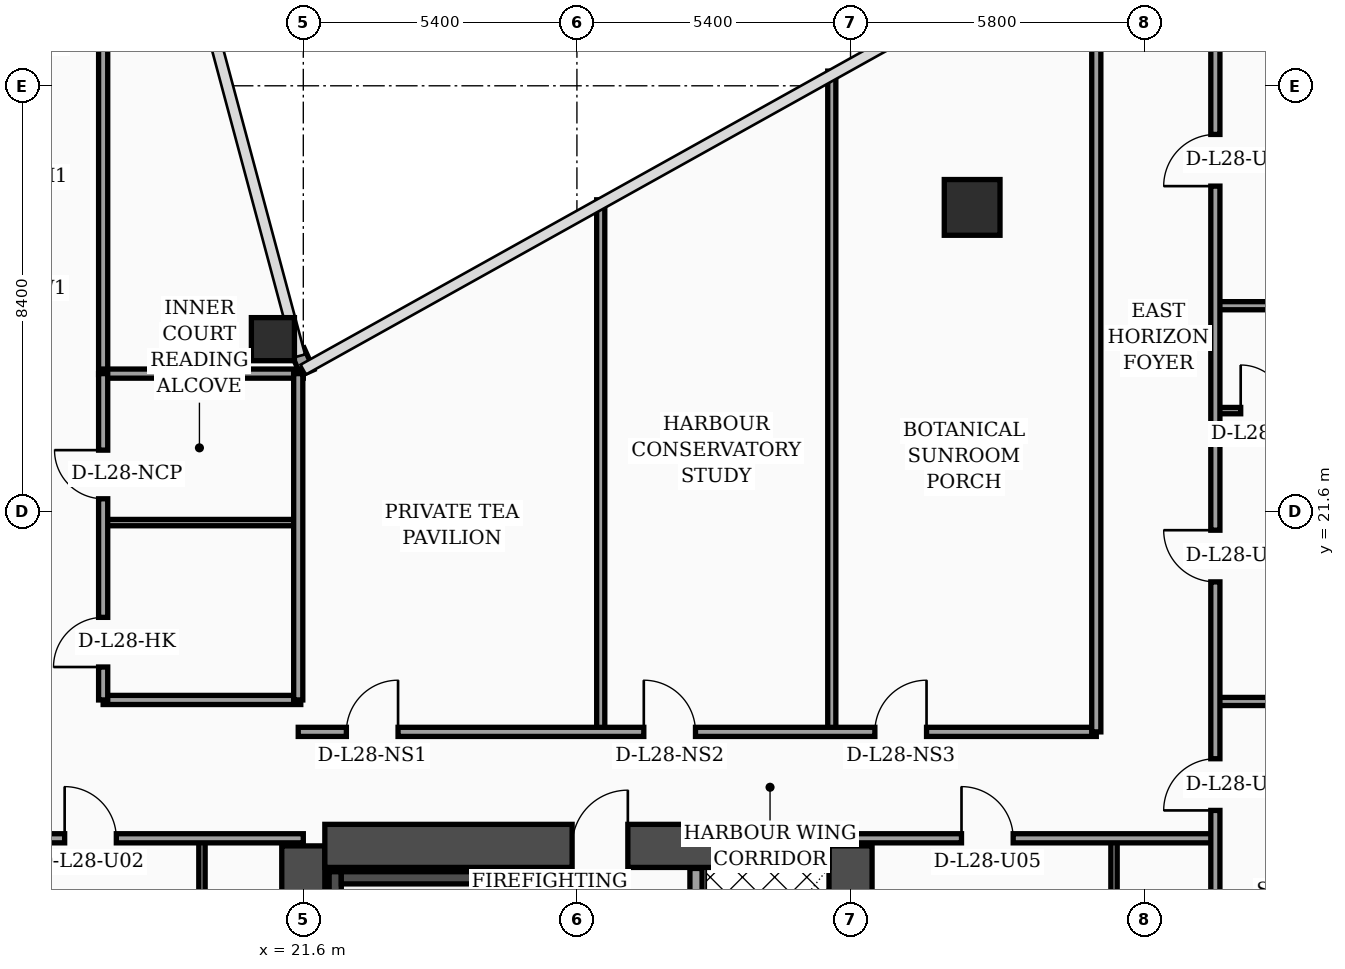
"""IFC4 building model, lengths in metres.
Left out: names, types, materials, properties, quantities, classifications, styles, units other than length and angle.
Written with IfcOpenShell. Run it as: python <this file> out.ifc"""

import sys

from ifc_helpers import new_model, si_unit, direction, frame, frame_2d, origin, origin_2d, place, context, subcontext, project, spatial, rectangle, hollow_rectangle, circle, extrude, element, fill, save


model = new_model("IFC4")
c1 = context("Model", 3, precision=1e-05, world=origin(), true_north=direction((0.0, 1.0)))
c2 = subcontext(c1, "Body", "Model", "MODEL_VIEW")
j1 = project(units=[si_unit("LENGTHUNIT", "METRE"), si_unit("PLANEANGLEUNIT", "RADIAN")], contexts=[c1])
p1 = place(None, origin())
s1 = spatial("IfcSite", under=j1, at=p1, CompositionType="ELEMENT")
p2 = place(p1, origin())
s2 = spatial("IfcBuilding", under=s1, at=p2, CompositionType="ELEMENT")
p3 = place(p2, frame((0.0, 0.0, 116.4)))
s3 = spatial("IfcBuildingStorey", under=s2, at=p3, CompositionType="ELEMENT", Elevation=116.4)
for number, where, z_axis, x_axis in (
    (1, (21.6, 4.6, 0.0), (0.0, 0.0, 1.0), (0.0, 1.0, 0.0)),
    (2, (32.4, 4.6, 0.0), (0.0, 0.0, 1.0), (0.0, 1.0, 0.0)),
):
    element("IfcWall", number, at=place(p3, frame(where, z_axis=z_axis, x_axis=x_axis)), inside=s3, PredefinedType="SHEAR", context=c2, shape_type="SweptSolid", body=[
        extrude(rectangle(XDim=10.4, YDim=0.85, at=frame_2d((5.2, 0.0))), origin(), (0.0, 0.0, 1.0), 3.56),
    ])
p4 = place(p3, frame((22.025, 15.0, 0.0), z_axis=(0.0, 0.0, 1.0), x_axis=(1.0, 0.0, 0.0)))
e3 = element("IfcWall", 3, at=p4, inside=s3, PredefinedType="SHEAR", context=c2, shape_type="SweptSolid", body=[
    extrude(rectangle(XDim=9.95, YDim=0.85, at=frame_2d((4.975, 0.0))), origin(), (0.0, 0.0, 1.0), 3.56),
])
p5 = place(p4, frame((4.88, 0.0, 0.0)))
e4 = element("IfcOpeningElement", 4, at=p5, cuts=e3, PredefinedType="OPENING", context=c2, shape_type="SweptSolid", body=[
    extrude(rectangle(XDim=1.1, YDim=2.2, at=frame_2d((0.55, 1.1))), frame((0.0, 0.435, 0.0), z_axis=(0.0, -1.0, 0.0), x_axis=(1.0, 0.0, 0.0)), (0.0, 0.0, 1.0), 0.87),
])
p6 = place(p3, frame((22.23, 5.025, 0.0), z_axis=(0.0, 0.0, 1.0), x_axis=(0.0, 1.0, 0.0)))
e5 = element("IfcWall", 5, at=p6, inside=s3, PredefinedType="SOLIDWALL", context=c2, shape_type="SweptSolid", body=[
    extrude(rectangle(XDim=9.465, YDim=0.24, at=frame_2d((4.732, 0.0))), origin(), (0.0, 0.0, 1.0), 3.56),
])
p7 = place(p3, frame((25.57, 5.025, 0.0), z_axis=(0.0, 0.0, 1.0), x_axis=(0.0, 1.0, 0.0)))
e6 = element("IfcWall", 6, at=p7, inside=s3, PredefinedType="SOLIDWALL", context=c2, shape_type="SweptSolid", body=[
    extrude(rectangle(XDim=9.465, YDim=0.24, at=frame_2d((4.732, 0.0))), origin(), (0.0, 0.0, 1.0), 3.56),
])
p8 = place(p7, frame((0.35, 0.0, 0.0)))
e7 = element("IfcOpeningElement", 7, at=p8, cuts=e6, PredefinedType="OPENING", context=c2, shape_type="SweptSolid", body=[
    extrude(rectangle(XDim=1.15, YDim=2.2, at=frame_2d((0.575, 1.1))), frame((0.0, 0.13, 0.0), z_axis=(0.0, -1.0, 0.0), x_axis=(1.0, 0.0, 0.0)), (0.0, 0.0, 1.0), 0.26),
])
p9 = place(p3, frame((22.35, 14.37, 0.0), z_axis=(0.0, 0.0, 1.0), x_axis=(1.0, 0.0, 0.0)))
e8 = element("IfcWall", 8, at=p9, inside=s3, PredefinedType="SOLIDWALL", context=c2, shape_type="SweptSolid", body=[
    extrude(rectangle(XDim=3.1, YDim=0.24, at=frame_2d((1.55, 0.0))), origin(), (0.0, 0.0, 1.0), 3.56),
])
p10 = place(p3, frame((21.0, 25.0, 0.0), z_axis=(0.0, 0.0, 1.0), x_axis=(1.0, 0.0, 0.0)))
e9 = element("IfcColumn", 9, at=p10, inside=s3, PredefinedType="COLUMN", context=c2, shape_type="SweptSolid", body=[
    extrude(hollow_rectangle(XDim=0.85, YDim=0.85, WallThickness=0.036, at=origin_2d()), origin(), (0.0, 0.0, 1.0), 3.56),
])
p11 = place(p3, frame((34.8, 27.6, 0.0), z_axis=(0.0, 0.0, 1.0), x_axis=(1.0, 0.0, 0.0)))
e10 = element("IfcColumn", 10, at=p11, inside=s3, PredefinedType="COLUMN", context=c2, shape_type="SweptSolid", body=[
    extrude(circle(Radius=0.55, at=origin_2d()), origin(), (0.0, 0.0, 1.0), 3.56),
])
p12 = place(p3, frame((21.68, 24.34, 0.0), z_axis=(0.0, 0.0, 1.0), x_axis=(-0.40758134973, 0.913168901875, 0.0)))
e11 = element("IfcWall", 11, at=p12, inside=s3, PredefinedType="SOLIDWALL", context=c2, shape_type="SweptSolid", body=[
    extrude(rectangle(XDim=0.471, YDim=0.28, at=frame_2d((0.235, 0.0))), origin(), (0.0, 0.0, 1.0), 3.56),
])
p13 = place(p3, frame((29.35, 5.045, 0.0), z_axis=(0.0, 0.0, 1.0), x_axis=(0.0, 1.0, 0.0)))
e12 = element("IfcWall", 12, at=p13, inside=s3, PredefinedType="SOLIDWALL", context=c2, shape_type="SweptSolid", body=[
    extrude(rectangle(XDim=9.51, YDim=0.24, at=frame_2d((4.755, 0.0))), origin(), (0.0, 0.0, 1.0), 3.56),
])
p14 = place(p13, frame((0.55, 0.0, 0.0)))
e13 = element("IfcOpeningElement", 13, at=p14, cuts=e12, PredefinedType="OPENING", context=c2, shape_type="SweptSolid", body=[
    extrude(rectangle(XDim=1.3, YDim=2.35, at=frame_2d((0.65, 1.175))), frame((0.0, 0.13, 0.0), z_axis=(0.0, -1.0, 0.0), x_axis=(1.0, 0.0, 0.0)), (0.0, 0.0, 1.0), 0.26),
])
p15 = place(p3, frame((19.6, 2.44, 0.0), z_axis=(0.0, 0.0, 1.0), x_axis=(0.0, 1.0, 0.0)))
e14 = element("IfcWall", 14, at=p15, inside=s3, PredefinedType="PARTITIONING", context=c2, shape_type="SweptSolid", body=[
    extrude(rectangle(XDim=12.71, YDim=0.125, at=frame_2d((6.355, 0.0))), origin(), (0.0, 0.0, 1.0), 2.49),
])
p16 = place(p15, frame((4.34, 0.0, 0.0)))
e15 = element("IfcOpeningElement", 15, at=p16, cuts=e14, PredefinedType="OPENING", context=c2, shape_type="SweptSolid", body=[
    extrude(rectangle(XDim=0.96, YDim=2.2, at=frame_2d((0.48, 1.1))), frame((0.0, 0.073, 0.0), z_axis=(0.0, -1.0, 0.0), x_axis=(1.0, 0.0, 0.0)), (0.0, 0.0, 1.0), 0.145),
])
p17 = place(p15, frame((10.18, 0.0, 0.0)))
e16 = element("IfcOpeningElement", 16, at=p17, cuts=e14, PredefinedType="OPENING", context=c2, shape_type="SweptSolid", body=[
    extrude(rectangle(XDim=0.9, YDim=2.15, at=frame_2d((0.45, 1.075))), frame((0.0, 0.073, 0.0), z_axis=(0.0, -1.0, 0.0), x_axis=(1.0, 0.0, 0.0)), (0.0, 0.0, 1.0), 0.145),
])
p18 = place(p3, frame((15.15, 15.15, 0.0), z_axis=(0.0, 0.0, 1.0), x_axis=(1.0, 0.0, 0.0)))
e17 = element("IfcWall", 17, at=p18, inside=s3, PredefinedType="PARTITIONING", context=c2, shape_type="SweptSolid", body=[
    extrude(rectangle(XDim=6.45, YDim=0.18, at=frame_2d((3.225, 0.0))), origin(), (0.0, 0.0, 1.0), 2.49),
])
p19 = place(p18, frame((1.74, 0.0, 0.0)))
e18 = element("IfcOpeningElement", 18, at=p19, cuts=e17, PredefinedType="OPENING", context=c2, shape_type="SweptSolid", body=[
    extrude(rectangle(XDim=1.02, YDim=2.2, at=frame_2d((0.51, 1.1))), frame((0.0, 0.1, 0.0), z_axis=(0.0, -1.0, 0.0), x_axis=(1.0, 0.0, 0.0)), (0.0, 0.0, 1.0), 0.2),
])
p20 = place(p3, frame((17.65, 24.3, 0.0), z_axis=(0.0, 0.0, 1.0), x_axis=(0.0, 1.0, 0.0)))
e19 = element("IfcWall", 19, at=p20, inside=s3, PredefinedType="PARTITIONING", context=c2, shape_type="SweptSolid", body=[
    extrude(rectangle(XDim=17.65, YDim=0.18, at=frame_2d((8.825, 0.0))), origin(), (0.0, 0.0, 1.0), 2.84),
])
p21 = place(p3, frame((17.65, 17.88, 0.0), z_axis=(0.0, 0.0, 1.0), x_axis=(1.0, 0.0, 0.0)))
e20 = element("IfcWall", 20, at=p21, inside=s3, PredefinedType="PARTITIONING", context=c2, shape_type="SweptSolid", body=[
    extrude(rectangle(XDim=3.9, YDim=0.18, at=frame_2d((1.95, 0.0))), origin(), (0.0, 0.0, 1.0), 3.56),
])
p22 = place(p3, frame((17.65, 21.38, 0.0), z_axis=(0.0, 0.0, 1.0), x_axis=(1.0, 0.0, 0.0)))
e21 = element("IfcWall", 21, at=p22, inside=s3, PredefinedType="PARTITIONING", context=c2, shape_type="SweptSolid", body=[
    extrude(rectangle(XDim=3.9, YDim=0.125, at=frame_2d((1.95, 0.0))), origin(), (0.0, 0.0, 1.0), 3.56),
])
p23 = place(p3, frame((17.65, 24.32, 0.0), z_axis=(0.0, 0.0, 1.0), x_axis=(1.0, 0.0, 0.0)))
e22 = element("IfcWall", 22, at=p23, inside=s3, PredefinedType="PARTITIONING", context=c2, shape_type="SweptSolid", body=[
    extrude(rectangle(XDim=3.95, YDim=0.18, at=frame_2d((1.975, 0.0))), origin(), (0.0, 0.0, 1.0), 3.56),
])
p24 = place(p3, frame((21.5, 17.88, 0.0), z_axis=(0.0, 0.0, 1.0), x_axis=(0.0, 1.0, 0.0)))
e23 = element("IfcWall", 23, at=p24, inside=s3, PredefinedType="PARTITIONING", context=c2, shape_type="SweptSolid", body=[
    extrude(rectangle(XDim=6.44, YDim=0.18, at=frame_2d((3.22, 0.0))), origin(), (0.0, 0.0, 1.0), 3.56),
])
p25 = place(p3, frame((17.65, 17.88, 0.0), z_axis=(0.0, 0.0, 1.0), x_axis=(0.0, 1.0, 0.0)))
e24 = element("IfcWall", 24, at=p25, inside=s3, PredefinedType="PARTITIONING", context=c2, shape_type="SweptSolid", body=[
    extrude(rectangle(XDim=6.44, YDim=0.18, at=frame_2d((3.22, 0.0))), origin(), (0.0, 0.0, 1.0), 3.56),
])
p26 = place(p25, frame((0.65, 0.0, 0.0)))
e25 = element("IfcOpeningElement", 25, at=p26, cuts=e24, PredefinedType="OPENING", context=c2, shape_type="SweptSolid", body=[
    extrude(rectangle(XDim=0.98, YDim=2.15, at=frame_2d((0.49, 1.075))), frame((0.0, 0.1, 0.0), z_axis=(0.0, -1.0, 0.0), x_axis=(1.0, 0.0, 0.0)), (0.0, 0.0, 1.0), 0.2),
])
p27 = place(p25, frame((3.97, 0.0, 0.0)))
e26 = element("IfcOpeningElement", 26, at=p27, cuts=e24, PredefinedType="OPENING", context=c2, shape_type="SweptSolid", body=[
    extrude(rectangle(XDim=0.96, YDim=2.2, at=frame_2d((0.48, 1.1))), frame((0.0, 0.1, 0.0), z_axis=(0.0, -1.0, 0.0), x_axis=(1.0, 0.0, 0.0)), (0.0, 0.0, 1.0), 0.2),
])
p28 = place(p3, frame((37.6, 2.44, 0.0), z_axis=(0.0, 0.0, 1.0), x_axis=(0.0, 1.0, 0.0)))
e27 = element("IfcWall", 27, at=p28, inside=s3, PredefinedType="PARTITIONING", context=c2, shape_type="SweptSolid", body=[
    extrude(rectangle(XDim=12.71, YDim=0.125, at=frame_2d((6.355, 0.0))), origin(), (0.0, 0.0, 1.0), 2.84),
])
p29 = place(p28, frame((4.35, 0.0, 0.0)))
e28 = element("IfcOpeningElement", 28, at=p29, cuts=e27, PredefinedType="OPENING", context=c2, shape_type="SweptSolid", body=[
    extrude(rectangle(XDim=0.96, YDim=2.2, at=frame_2d((0.48, 1.1))), frame((0.0, 0.073, 0.0), z_axis=(0.0, -1.0, 0.0), x_axis=(1.0, 0.0, 0.0)), (0.0, 0.0, 1.0), 0.145),
])
p30 = place(p28, frame((10.21, 0.0, 0.0)))
e29 = element("IfcOpeningElement", 29, at=p30, cuts=e27, PredefinedType="OPENING", context=c2, shape_type="SweptSolid", body=[
    extrude(rectangle(XDim=0.9, YDim=2.15, at=frame_2d((0.45, 1.075))), frame((0.0, 0.073, 0.0), z_axis=(0.0, -1.0, 0.0), x_axis=(1.0, 0.0, 0.0)), (0.0, 0.0, 1.0), 0.145),
])
p31 = place(p3, frame((32.4, 15.15, 0.0), z_axis=(0.0, 0.0, 1.0), x_axis=(1.0, 0.0, 0.0)))
e30 = element("IfcWall", 30, at=p31, inside=s3, PredefinedType="PARTITIONING", context=c2, shape_type="SweptSolid", body=[
    extrude(rectangle(XDim=7.2, YDim=0.18, at=frame_2d((3.6, 0.0))), origin(), (0.0, 0.0, 1.0), 2.84),
])
p32 = place(p31, frame((2.19, 0.0, 0.0)))
e31 = element("IfcOpeningElement", 31, at=p32, cuts=e30, PredefinedType="OPENING", context=c2, shape_type="SweptSolid", body=[
    extrude(rectangle(XDim=1.02, YDim=2.2, at=frame_2d((0.51, 1.1))), frame((0.0, 0.1, 0.0), z_axis=(0.0, -1.0, 0.0), x_axis=(1.0, 0.0, 0.0)), (0.0, 0.0, 1.0), 0.2),
])
p33 = place(p3, frame((27.47, 17.25, 0.0), z_axis=(0.0, 0.0, 1.0), x_axis=(0.0, 1.0, 0.0)))
e32 = element("IfcWall", 32, at=p33, inside=s3, PredefinedType="PARTITIONING", context=c2, shape_type="SweptSolid", body=[
    extrude(rectangle(XDim=10.5, YDim=0.16, at=frame_2d((5.25, 0.0))), origin(), (0.0, 0.0, 1.0), 2.84),
])
p34 = place(p3, frame((32.03, 17.25, 0.0), z_axis=(0.0, 0.0, 1.0), x_axis=(0.0, 1.0, 0.0)))
e33 = element("IfcWall", 33, at=p34, inside=s3, PredefinedType="PARTITIONING", context=c2, shape_type="SweptSolid", body=[
    extrude(rectangle(XDim=13.04, YDim=0.16, at=frame_2d((6.52, 0.0))), origin(), (0.0, 0.0, 1.0), 2.84),
])
p35 = place(p3, frame((21.5, 17.25, 0.0), z_axis=(0.0, 0.0, 1.0), x_axis=(1.0, 0.0, 0.0)))
e34 = element("IfcWall", 34, at=p35, inside=s3, PredefinedType="PARTITIONING", context=c2, shape_type="SweptSolid", body=[
    extrude(rectangle(XDim=15.75, YDim=0.18, at=frame_2d((7.875, 0.0))), origin(), (0.0, 0.0, 1.0), 2.84),
])
p36 = place(p35, frame((0.95, 0.0, 0.0)))
e35 = element("IfcOpeningElement", 35, at=p36, cuts=e34, PredefinedType="OPENING", context=c2, shape_type="SweptSolid", body=[
    extrude(rectangle(XDim=1.02, YDim=2.2, at=frame_2d((0.51, 1.1))), frame((0.0, 0.1, 0.0), z_axis=(0.0, -1.0, 0.0), x_axis=(1.0, 0.0, 0.0)), (0.0, 0.0, 1.0), 0.2),
])
p37 = place(p35, frame((6.82, 0.0, 0.0)))
e36 = element("IfcOpeningElement", 36, at=p37, cuts=e34, PredefinedType="OPENING", context=c2, shape_type="SweptSolid", body=[
    extrude(rectangle(XDim=1.02, YDim=2.2, at=frame_2d((0.51, 1.1))), frame((0.0, 0.1, 0.0), z_axis=(0.0, -1.0, 0.0), x_axis=(1.0, 0.0, 0.0)), (0.0, 0.0, 1.0), 0.2),
])
p38 = place(p35, frame((11.38, 0.0, 0.0)))
e37 = element("IfcOpeningElement", 37, at=p38, cuts=e34, PredefinedType="OPENING", context=c2, shape_type="SweptSolid", body=[
    extrude(rectangle(XDim=1.02, YDim=2.2, at=frame_2d((0.51, 1.1))), frame((0.0, 0.1, 0.0), z_axis=(0.0, -1.0, 0.0), x_axis=(1.0, 0.0, 0.0)), (0.0, 0.0, 1.0), 0.2),
])
p39 = place(p3, frame((37.25, 17.25, 0.0), z_axis=(0.0, 0.0, 1.0), x_axis=(0.0, 1.0, 0.0)))
e38 = element("IfcWall", 38, at=p39, inside=s3, PredefinedType="PARTITIONING", context=c2, shape_type="SweptSolid", body=[
    extrude(rectangle(XDim=15.95, YDim=0.18, at=frame_2d((7.975, 0.0))), origin(), (0.0, 0.0, 1.0), 2.84),
])
p40 = place(p3, frame((39.6, 23.59, 0.0), z_axis=(0.0, 0.0, 1.0), x_axis=(1.0, 0.0, 0.0)))
e39 = element("IfcWall", 39, at=p40, inside=s3, PredefinedType="PARTITIONING", context=c2, shape_type="SweptSolid", body=[
    extrude(rectangle(XDim=13.87, YDim=0.125, at=frame_2d((6.935, 0.0))), origin(), (0.0, 0.0, 1.0), 2.84),
])
p41 = place(p40, frame((0.5, 0.0, 0.0)))
e40 = element("IfcOpeningElement", 40, at=p41, cuts=e39, PredefinedType="OPENING", context=c2, shape_type="SweptSolid", body=[
    extrude(rectangle(XDim=0.9, YDim=2.15, at=frame_2d((0.45, 1.075))), frame((0.0, 0.073, 0.0), z_axis=(0.0, -1.0, 0.0), x_axis=(1.0, 0.0, 0.0)), (0.0, 0.0, 1.0), 0.145),
])
p42 = place(p40, frame((3.6, 0.0, 0.0)))
e41 = element("IfcOpeningElement", 41, at=p42, cuts=e39, PredefinedType="OPENING", context=c2, shape_type="SweptSolid", body=[
    extrude(rectangle(XDim=0.96, YDim=2.2, at=frame_2d((0.48, 1.1))), frame((0.0, 0.073, 0.0), z_axis=(0.0, -1.0, 0.0), x_axis=(1.0, 0.0, 0.0)), (0.0, 0.0, 1.0), 0.145),
])
p43 = place(p3, frame((39.6, 25.66, 0.0), z_axis=(0.0, 0.0, 1.0), x_axis=(1.0, 0.0, 0.0)))
e42 = element("IfcWall", 42, at=p43, inside=s3, PredefinedType="PARTITIONING", context=c2, shape_type="SweptSolid", body=[
    extrude(rectangle(XDim=13.22, YDim=0.16, at=frame_2d((6.61, 0.0))), origin(), (0.0, 0.0, 1.0), 2.84),
])
p44 = place(p3, frame((39.6, 17.85, 0.0), z_axis=(0.0, 0.0, 1.0), x_axis=(1.0, 0.0, 0.0)))
e43 = element("IfcWall", 43, at=p44, inside=s3, PredefinedType="PARTITIONING", context=c2, shape_type="SweptSolid", body=[
    extrude(rectangle(XDim=15.68, YDim=0.16, at=frame_2d((7.84, 0.0))), origin(), (0.0, 0.0, 1.0), 2.84),
])
p45 = place(p3, frame((39.6, 2.44, 0.0), z_axis=(0.0, 0.0, 1.0), x_axis=(0.0, 1.0, 0.0)))
e44 = element("IfcWall", 44, at=p45, inside=s3, PredefinedType="PARTITIONING", context=c2, shape_type="SweptSolid", body=[
    extrude(rectangle(XDim=31.04, YDim=0.18, at=frame_2d((15.52, 0.0))), origin(), (0.0, 0.0, 1.0), 2.84),
])
p46 = place(p45, frame((13.26, 0.0, 0.0)))
e45 = element("IfcOpeningElement", 45, at=p46, cuts=e44, PredefinedType="OPENING", context=c2, shape_type="SweptSolid", body=[
    extrude(rectangle(XDim=1.02, YDim=2.2, at=frame_2d((0.51, 1.1))), frame((0.0, 0.1, 0.0), z_axis=(0.0, -1.0, 0.0), x_axis=(1.0, 0.0, 0.0)), (0.0, 0.0, 1.0), 0.2),
])
p47 = place(p45, frame((17.77, 0.0, 0.0)))
e46 = element("IfcOpeningElement", 46, at=p47, cuts=e44, PredefinedType="OPENING", context=c2, shape_type="SweptSolid", body=[
    extrude(rectangle(XDim=1.02, YDim=2.2, at=frame_2d((0.51, 1.1))), frame((0.0, 0.1, 0.0), z_axis=(0.0, -1.0, 0.0), x_axis=(1.0, 0.0, 0.0)), (0.0, 0.0, 1.0), 0.2),
])
p48 = place(p45, frame((25.58, 0.0, 0.0)))
e47 = element("IfcOpeningElement", 47, at=p48, cuts=e44, PredefinedType="OPENING", context=c2, shape_type="SweptSolid", body=[
    extrude(rectangle(XDim=1.02, YDim=2.2, at=frame_2d((0.51, 1.1))), frame((0.0, 0.1, 0.0), z_axis=(0.0, -1.0, 0.0), x_axis=(1.0, 0.0, 0.0)), (0.0, 0.0, 1.0), 0.2),
])
p49 = place(p19, origin())
e48 = element("IfcDoor", 48, at=p49, inside=s3, OperationType="SINGLE_SWING_LEFT", PredefinedType="DOOR", context=c2, shape_type="SweptSolid", body=[
    extrude(rectangle(XDim=1.02, YDim=2.2, at=frame_2d((0.51, 1.1))), frame((0.0, 0.025, 0.0), z_axis=(0.0, -1.0, 0.0), x_axis=(1.0, 0.0, 0.0)), (0.0, 0.0, 1.0), 0.05),
])
fill(e18, e48)
p50 = place(p26, origin())
e49 = element("IfcDoor", 49, at=p50, inside=s3, OperationType="SINGLE_SWING_LEFT", PredefinedType="DOOR", context=c2, shape_type="SweptSolid", body=[
    extrude(rectangle(XDim=0.98, YDim=2.15, at=frame_2d((0.49, 1.075))), frame((0.0, 0.025, 0.0), z_axis=(0.0, -1.0, 0.0), x_axis=(1.0, 0.0, 0.0)), (0.0, 0.0, 1.0), 0.05),
])
fill(e25, e49)
p51 = place(p27, origin())
e50 = element("IfcDoor", 50, at=p51, inside=s3, OperationType="SINGLE_SWING_RIGHT", PredefinedType="DOOR", context=c2, shape_type="SweptSolid", body=[
    extrude(rectangle(XDim=0.96, YDim=2.2, at=frame_2d((0.48, 1.1))), frame((0.0, 0.025, 0.0), z_axis=(0.0, -1.0, 0.0), x_axis=(1.0, 0.0, 0.0)), (0.0, 0.0, 1.0), 0.05),
])
fill(e26, e50)
p52 = place(p32, origin())
e51 = element("IfcDoor", 51, at=p52, inside=s3, OperationType="SINGLE_SWING_LEFT", PredefinedType="DOOR", context=c2, shape_type="SweptSolid", body=[
    extrude(rectangle(XDim=1.02, YDim=2.2, at=frame_2d((0.51, 1.1))), frame((0.0, 0.025, 0.0), z_axis=(0.0, -1.0, 0.0), x_axis=(1.0, 0.0, 0.0)), (0.0, 0.0, 1.0), 0.05),
])
fill(e31, e51)
p53 = place(p36, origin())
e52 = element("IfcDoor", 52, at=p53, inside=s3, OperationType="SINGLE_SWING_RIGHT", PredefinedType="DOOR", context=c2, shape_type="SweptSolid", body=[
    extrude(rectangle(XDim=1.02, YDim=2.2, at=frame_2d((0.51, 1.1))), frame((0.0, 0.025, 0.0), z_axis=(0.0, -1.0, 0.0), x_axis=(1.0, 0.0, 0.0)), (0.0, 0.0, 1.0), 0.05),
])
fill(e35, e52)
p54 = place(p37, origin())
e53 = element("IfcDoor", 53, at=p54, inside=s3, OperationType="SINGLE_SWING_LEFT", PredefinedType="DOOR", context=c2, shape_type="SweptSolid", body=[
    extrude(rectangle(XDim=1.02, YDim=2.2, at=frame_2d((0.51, 1.1))), frame((0.0, 0.025, 0.0), z_axis=(0.0, -1.0, 0.0), x_axis=(1.0, 0.0, 0.0)), (0.0, 0.0, 1.0), 0.05),
])
fill(e36, e53)
p55 = place(p38, origin())
e54 = element("IfcDoor", 54, at=p55, inside=s3, OperationType="SINGLE_SWING_RIGHT", PredefinedType="DOOR", context=c2, shape_type="SweptSolid", body=[
    extrude(rectangle(XDim=1.02, YDim=2.2, at=frame_2d((0.51, 1.1))), frame((0.0, 0.025, 0.0), z_axis=(0.0, -1.0, 0.0), x_axis=(1.0, 0.0, 0.0)), (0.0, 0.0, 1.0), 0.05),
])
fill(e37, e54)
p56 = place(p41, origin())
e55 = element("IfcDoor", 55, at=p56, inside=s3, OperationType="SINGLE_SWING_LEFT", PredefinedType="DOOR", context=c2, shape_type="SweptSolid", body=[
    extrude(rectangle(XDim=0.9, YDim=2.15, at=frame_2d((0.45, 1.075))), frame((0.0, 0.025, 0.0), z_axis=(0.0, -1.0, 0.0), x_axis=(1.0, 0.0, 0.0)), (0.0, 0.0, 1.0), 0.05),
])
fill(e40, e55)
p57 = place(p46, origin())
e56 = element("IfcDoor", 56, at=p57, inside=s3, OperationType="SINGLE_SWING_LEFT", PredefinedType="DOOR", context=c2, shape_type="SweptSolid", body=[
    extrude(rectangle(XDim=1.02, YDim=2.2, at=frame_2d((0.51, 1.1))), frame((0.0, 0.025, 0.0), z_axis=(0.0, -1.0, 0.0), x_axis=(1.0, 0.0, 0.0)), (0.0, 0.0, 1.0), 0.05),
])
fill(e45, e56)
p58 = place(p47, origin())
e57 = element("IfcDoor", 57, at=p58, inside=s3, OperationType="SINGLE_SWING_RIGHT", PredefinedType="DOOR", context=c2, shape_type="SweptSolid", body=[
    extrude(rectangle(XDim=1.02, YDim=2.2, at=frame_2d((0.51, 1.1))), frame((0.0, 0.025, 0.0), z_axis=(0.0, -1.0, 0.0), x_axis=(1.0, 0.0, 0.0)), (0.0, 0.0, 1.0), 0.05),
])
fill(e46, e57)
p59 = place(p48, origin())
e58 = element("IfcDoor", 58, at=p59, inside=s3, OperationType="SINGLE_SWING_LEFT", PredefinedType="DOOR", context=c2, shape_type="SweptSolid", body=[
    extrude(rectangle(XDim=1.02, YDim=2.2, at=frame_2d((0.51, 1.1))), frame((0.0, 0.025, 0.0), z_axis=(0.0, -1.0, 0.0), x_axis=(1.0, 0.0, 0.0)), (0.0, 0.0, 1.0), 0.05),
])
fill(e47, e58)
p60 = place(p5, origin())
e59 = element("IfcDoor", 59, at=p60, inside=s3, OperationType="SINGLE_SWING_RIGHT", PredefinedType="DOOR", context=c2, shape_type="SweptSolid", body=[
    extrude(rectangle(XDim=1.1, YDim=2.2, at=frame_2d((0.55, 1.1))), frame((0.0, 0.025, 0.0), z_axis=(0.0, -1.0, 0.0), x_axis=(1.0, 0.0, 0.0)), (0.0, 0.0, 1.0), 0.05),
])
fill(e4, e59)
save(model, sys.argv[1])
